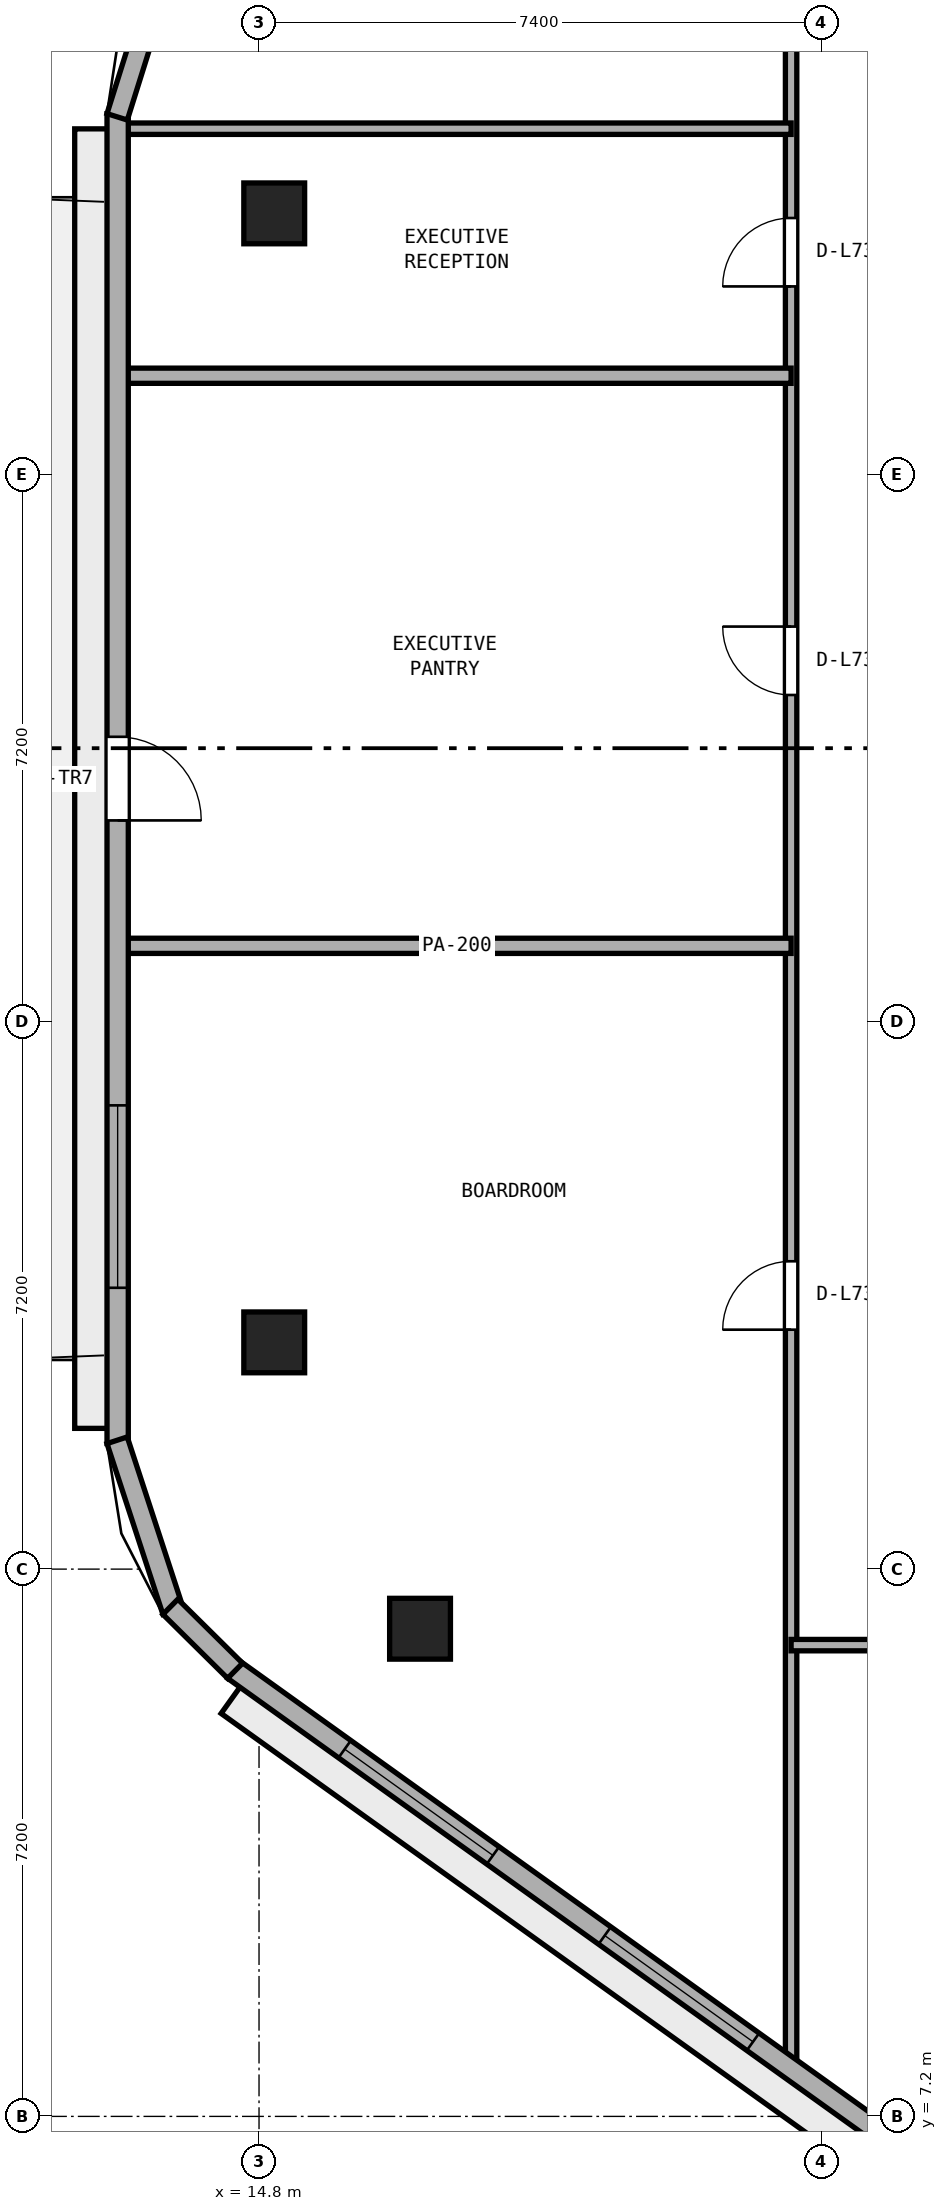
"""IFC4 building model, lengths in metres.
Left out: names, types, materials, properties, quantities, classifications, styles, units other than length and angle.
Written with IfcOpenShell. Run it as: python <this file> out.ifc"""

import sys

from ifc_helpers import new_model, si_unit, direction, frame, frame_2d, origin, origin_2d, place, context, subcontext, project, spatial, rectangle, extrude, element, fill, save


model = new_model("IFC4")
c1 = context("Model", 3, precision=1e-05, world=origin(), true_north=direction((0.0, 1.0)))
c2 = subcontext(c1, "Body", "Model", "MODEL_VIEW")
j1 = project(units=[si_unit("LENGTHUNIT", "METRE"), si_unit("PLANEANGLEUNIT", "RADIAN")], contexts=[c1])
p1 = place(None, origin())
s1 = spatial("IfcSite", under=j1, at=p1, CompositionType="ELEMENT")
p2 = place(p1, origin())
s2 = spatial("IfcBuilding", under=s1, at=p2, CompositionType="ELEMENT")
p3 = place(p2, frame((0.0, 0.0, 285.8)))
s3 = spatial("IfcBuildingStorey", under=s2, at=p3, CompositionType="ELEMENT", Elevation=285.8)
for number, where, z_axis, x_axis in (
    (1, (15.0, 32.236, 0.0), (0.0, 0.0, 1.0), (1.0, 0.0, 0.0)),
    (2, (15.0, 17.383, 0.0), (0.0, 0.0, 1.0), (1.0, 0.0, 0.0)),
    (3, (16.918, 13.616, 0.0), (0.0, 0.0, 1.0), (1.0, 0.0, 0.0)),
):
    element("IfcColumn", number, at=place(p3, frame(where, z_axis=z_axis, x_axis=x_axis)), inside=s3, PredefinedType="COLUMN", context=c2, shape_type="SweptSolid", body=[
        extrude(rectangle(XDim=0.8, YDim=0.8, at=origin_2d()), origin(), (0.0, 0.0, 1.0), 3.8),
    ])
p4 = place(p3, frame((21.8, 7.79, 0.0), z_axis=(0.0, 0.0, 1.0), x_axis=(0.0, 1.0, 0.0)))
e4 = element("IfcWall", 4, at=p4, inside=s3, PredefinedType="PARTITIONING", context=c2, shape_type="SweptSolid", body=[
    extrude(rectangle(XDim=29.21, YDim=0.15, at=frame_2d((14.605, 0.0))), origin(), (0.0, 0.0, 1.0), 3.54),
])
p5 = place(p4, frame((9.76, 0.0, 0.0)))
e5 = element("IfcOpeningElement", 5, at=p5, cuts=e4, PredefinedType="OPENING", context=c2, shape_type="SweptSolid", body=[
    extrude(rectangle(XDim=0.9, YDim=2.1, at=frame_2d((0.45, 1.05))), frame((0.0, 0.085, 0.0), z_axis=(0.0, -1.0, 0.0), x_axis=(1.0, 0.0, 0.0)), (0.0, 0.0, 1.0), 0.17),
])
p6 = place(p4, frame((18.11, 0.0, 0.0)))
e6 = element("IfcOpeningElement", 6, at=p6, cuts=e4, PredefinedType="OPENING", context=c2, shape_type="SweptSolid", body=[
    extrude(rectangle(XDim=0.9, YDim=2.1, at=frame_2d((0.45, 1.05))), frame((0.0, 0.085, 0.0), z_axis=(0.0, -1.0, 0.0), x_axis=(1.0, 0.0, 0.0)), (0.0, 0.0, 1.0), 0.17),
])
p7 = place(p4, frame((23.485, 0.0, 0.0)))
e7 = element("IfcOpeningElement", 7, at=p7, cuts=e4, PredefinedType="OPENING", context=c2, shape_type="SweptSolid", body=[
    extrude(rectangle(XDim=0.9, YDim=2.1, at=frame_2d((0.45, 1.05))), frame((0.0, 0.085, 0.0), z_axis=(0.0, -1.0, 0.0), x_axis=(1.0, 0.0, 0.0)), (0.0, 0.0, 1.0), 0.17),
])
p8 = place(p3, frame((21.8, 13.4, 0.0), z_axis=(0.0, 0.0, 1.0), x_axis=(1.0, 0.0, 0.0)))
e8 = element("IfcWall", 8, at=p8, inside=s3, PredefinedType="PARTITIONING", context=c2, shape_type="SweptSolid", body=[
    extrude(rectangle(XDim=26.8, YDim=0.15, at=frame_2d((13.4, 0.0))), origin(), (0.0, 0.0, 1.0), 3.54),
])
p9 = place(p8, frame((3.92, 0.0, 0.0)))
e9 = element("IfcOpeningElement", 9, at=p9, cuts=e8, PredefinedType="OPENING", context=c2, shape_type="SweptSolid", body=[
    extrude(rectangle(XDim=1.0, YDim=2.12, at=frame_2d((0.5, 1.06))), frame((0.0, 0.085, 0.0), z_axis=(0.0, -1.0, 0.0), x_axis=(1.0, 0.0, 0.0)), (0.0, 0.0, 1.0), 0.17),
])
p10 = place(p8, frame((13.85, 0.0, 0.0)))
e10 = element("IfcOpeningElement", 10, at=p10, cuts=e8, PredefinedType="OPENING", context=c2, shape_type="SweptSolid", body=[
    extrude(rectangle(XDim=1.0, YDim=2.12, at=frame_2d((0.5, 1.06))), frame((0.0, 0.085, 0.0), z_axis=(0.0, -1.0, 0.0), x_axis=(1.0, 0.0, 0.0)), (0.0, 0.0, 1.0), 0.17),
])
p11 = place(p8, frame((22.88, 0.0, 0.0)))
e11 = element("IfcOpeningElement", 11, at=p11, cuts=e8, PredefinedType="OPENING", context=c2, shape_type="SweptSolid", body=[
    extrude(rectangle(XDim=0.9, YDim=2.1, at=frame_2d((0.45, 1.05))), frame((0.0, 0.085, 0.0), z_axis=(0.0, -1.0, 0.0), x_axis=(1.0, 0.0, 0.0)), (0.0, 0.0, 1.0), 0.17),
])
for number, where, z_axis, x_axis in (
    (12, (13.005, 22.6, 0.0), (0.0, 0.0, 1.0), (1.0, 0.0, 0.0)),
    (13, (13.005, 30.1, 0.0), (0.0, 0.0, 1.0), (1.0, 0.0, 0.0)),
):
    element("IfcWall", number, at=place(p3, frame(where, z_axis=z_axis, x_axis=x_axis)), inside=s3, PredefinedType="PARTITIONING", context=c2, shape_type="SweptSolid", body=[
        extrude(rectangle(XDim=8.795, YDim=0.2, at=frame_2d((4.397, 0.0))), origin(), (0.0, 0.0, 1.0), 3.54),
    ])
p12 = place(p3, frame((13.005, 33.35, 0.0), z_axis=(0.0, 0.0, 1.0), x_axis=(1.0, 0.0, 0.0)))
e14 = element("IfcWall", 14, at=p12, inside=s3, PredefinedType="PARTITIONING", context=c2, shape_type="SweptSolid", body=[
    extrude(rectangle(XDim=8.795, YDim=0.15, at=frame_2d((4.397, 0.0))), origin(), (0.0, 0.0, 1.0), 3.54),
])
p13 = place(p3, frame((12.94, 33.548, 0.0), z_axis=(0.0, 0.0, 1.0), x_axis=(0.0, -1.0, 0.0)))
e15 = element("IfcWall", 15, at=p13, inside=s3, PredefinedType="STANDARD", context=c2, shape_type="SweptSolid", body=[
    extrude(rectangle(XDim=17.496, YDim=0.28, at=frame_2d((8.748, 0.0))), origin(), (0.0, 0.0, 1.0), 3.54),
])
p14 = place(p13, frame((8.198, 0.0, 0.0)))
e16 = element("IfcOpeningElement", 16, at=p14, cuts=e15, PredefinedType="OPENING", context=c2, shape_type="SweptSolid", body=[
    extrude(rectangle(XDim=1.1, YDim=2.2, at=frame_2d((0.55, 1.1))), frame((0.0, 0.15, 0.0), z_axis=(0.0, -1.0, 0.0), x_axis=(1.0, 0.0, 0.0)), (0.0, 0.0, 1.0), 0.3),
])
p15 = place(p13, frame((13.047, 0.0, 0.9)))
e17 = element("IfcOpeningElement", 17, at=p15, cuts=e15, PredefinedType="OPENING", context=c2, shape_type="SweptSolid", body=[
    extrude(rectangle(XDim=2.4, YDim=1.75, at=frame_2d((1.2, 0.875))), frame((0.0, 0.15, 0.0), z_axis=(0.0, -1.0, 0.0), x_axis=(1.0, 0.0, 0.0)), (0.0, 0.0, 1.0), 0.3),
])
p16 = place(p3, frame((14.468, 13.077, 0.0), z_axis=(0.0, 0.0, 1.0), x_axis=(0.812809888039, -0.582529042972, 0.0)))
e18 = element("IfcWall", 18, at=p16, inside=s3, PredefinedType="STANDARD", context=c2, shape_type="SweptSolid", body=[
    extrude(rectangle(XDim=15.968, YDim=0.28, at=frame_2d((7.984, 0.0))), origin(), (0.0, 0.0, 1.0), 3.54),
])
p17 = place(p16, frame((1.795, 0.0, 0.9)))
e19 = element("IfcOpeningElement", 19, at=p17, cuts=e18, PredefinedType="OPENING", context=c2, shape_type="SweptSolid", body=[
    extrude(rectangle(XDim=2.4, YDim=1.75, at=frame_2d((1.2, 0.875))), frame((0.0, 0.15, 0.0), z_axis=(0.0, -1.0, 0.0), x_axis=(1.0, 0.0, 0.0)), (0.0, 0.0, 1.0), 0.3),
])
p18 = place(p16, frame((6.004, 0.0, 0.9)))
e20 = element("IfcOpeningElement", 20, at=p18, cuts=e18, PredefinedType="OPENING", context=c2, shape_type="SweptSolid", body=[
    extrude(rectangle(XDim=2.4, YDim=1.75, at=frame_2d((1.2, 0.875))), frame((0.0, 0.15, 0.0), z_axis=(0.0, -1.0, 0.0), x_axis=(1.0, 0.0, 0.0)), (0.0, 0.0, 1.0), 0.3),
])
p19 = place(p16, frame((11.773, 0.0, 0.9)))
e21 = element("IfcOpeningElement", 21, at=p19, cuts=e18, PredefinedType="OPENING", context=c2, shape_type="SweptSolid", body=[
    extrude(rectangle(XDim=2.4, YDim=1.75, at=frame_2d((1.2, 0.875))), frame((0.0, 0.15, 0.0), z_axis=(0.0, -1.0, 0.0), x_axis=(1.0, 0.0, 0.0)), (0.0, 0.0, 1.0), 0.3),
])
p20 = place(p3, frame((13.615, 35.677, 0.0), z_axis=(0.0, 0.0, 1.0), x_axis=(-0.299374552426, -0.954135670311, 0.0)))
e22 = element("IfcWall", 22, at=p20, inside=s3, PredefinedType="STANDARD", context=c2, shape_type="SweptSolid", body=[
    extrude(rectangle(XDim=2.275, YDim=0.28, at=frame_2d((1.138, 0.0))), origin(), (0.0, 0.0, 1.0), 3.54),
])
p21 = place(p3, frame((12.933, 16.095, 0.0), z_axis=(0.0, 0.0, 1.0), x_axis=(0.3110492363, -0.950393798695, 0.0)))
e23 = element("IfcWall", 23, at=p21, inside=s3, PredefinedType="STANDARD", context=c2, shape_type="SweptSolid", body=[
    extrude(rectangle(XDim=2.364, YDim=0.28, at=frame_2d((1.182, 0.0))), origin(), (0.0, 0.0, 1.0), 3.54),
])
p22 = place(p3, frame((13.634, 13.904, 0.0), z_axis=(0.0, 0.0, 1.0), x_axis=(0.710971221429, -0.703221104845, 0.0)))
e24 = element("IfcWall", 24, at=p22, inside=s3, PredefinedType="STANDARD", context=c2, shape_type="SweptSolid", body=[
    extrude(rectangle(XDim=1.197, YDim=0.28, at=frame_2d((0.599, 0.0))), origin(), (0.0, 0.0, 1.0), 3.54),
])
p23 = place(p5, origin())
e25 = element("IfcDoor", 25, at=p23, inside=s3, OperationType="SINGLE_SWING_LEFT", PredefinedType="DOOR", context=c2, shape_type="SweptSolid", body=[
    extrude(rectangle(XDim=0.9, YDim=2.1, at=frame_2d((0.45, 1.05))), frame((0.0, 0.025, 0.0), z_axis=(0.0, -1.0, 0.0), x_axis=(1.0, 0.0, 0.0)), (0.0, 0.0, 1.0), 0.05),
])
fill(e5, e25)
p24 = place(p6, origin())
e26 = element("IfcDoor", 26, at=p24, inside=s3, OperationType="SINGLE_SWING_RIGHT", PredefinedType="DOOR", context=c2, shape_type="SweptSolid", body=[
    extrude(rectangle(XDim=0.9, YDim=2.1, at=frame_2d((0.45, 1.05))), frame((0.0, 0.025, 0.0), z_axis=(0.0, -1.0, 0.0), x_axis=(1.0, 0.0, 0.0)), (0.0, 0.0, 1.0), 0.05),
])
fill(e6, e26)
p25 = place(p7, origin())
e27 = element("IfcDoor", 27, at=p25, inside=s3, OperationType="SINGLE_SWING_LEFT", PredefinedType="DOOR", context=c2, shape_type="SweptSolid", body=[
    extrude(rectangle(XDim=0.9, YDim=2.1, at=frame_2d((0.45, 1.05))), frame((0.0, 0.025, 0.0), z_axis=(0.0, -1.0, 0.0), x_axis=(1.0, 0.0, 0.0)), (0.0, 0.0, 1.0), 0.05),
])
fill(e7, e27)
p26 = place(p14, origin())
e28 = element("IfcDoor", 28, at=p26, inside=s3, OperationType="SINGLE_SWING_RIGHT", PredefinedType="DOOR", context=c2, shape_type="SweptSolid", body=[
    extrude(rectangle(XDim=1.1, YDim=2.2, at=frame_2d((0.55, 1.1))), frame((0.0, 0.025, 0.0), z_axis=(0.0, -1.0, 0.0), x_axis=(1.0, 0.0, 0.0)), (0.0, 0.0, 1.0), 0.05),
])
fill(e16, e28)
p27 = place(p15, origin())
e29 = element("IfcWindow", 29, at=p27, inside=s3, PartitioningType="SINGLE_PANEL", PredefinedType="WINDOW", context=c2, shape_type="SweptSolid", body=[
    extrude(rectangle(XDim=2.4, YDim=1.75, at=frame_2d((1.2, 0.875))), frame((0.0, 0.03, 0.0), z_axis=(0.0, -1.0, 0.0), x_axis=(1.0, 0.0, 0.0)), (0.0, 0.0, 1.0), 0.06),
])
fill(e17, e29)
p28 = place(p17, origin())
e30 = element("IfcWindow", 30, at=p28, inside=s3, PartitioningType="SINGLE_PANEL", PredefinedType="WINDOW", context=c2, shape_type="SweptSolid", body=[
    extrude(rectangle(XDim=2.4, YDim=1.75, at=frame_2d((1.2, 0.875))), frame((0.0, 0.03, 0.0), z_axis=(0.0, -1.0, 0.0), x_axis=(1.0, 0.0, 0.0)), (0.0, 0.0, 1.0), 0.06),
])
fill(e19, e30)
p29 = place(p18, origin())
e31 = element("IfcWindow", 31, at=p29, inside=s3, PartitioningType="SINGLE_PANEL", PredefinedType="WINDOW", context=c2, shape_type="SweptSolid", body=[
    extrude(rectangle(XDim=2.4, YDim=1.75, at=frame_2d((1.2, 0.875))), frame((0.0, 0.03, 0.0), z_axis=(0.0, -1.0, 0.0), x_axis=(1.0, 0.0, 0.0)), (0.0, 0.0, 1.0), 0.06),
])
fill(e20, e31)
save(model, sys.argv[1])
